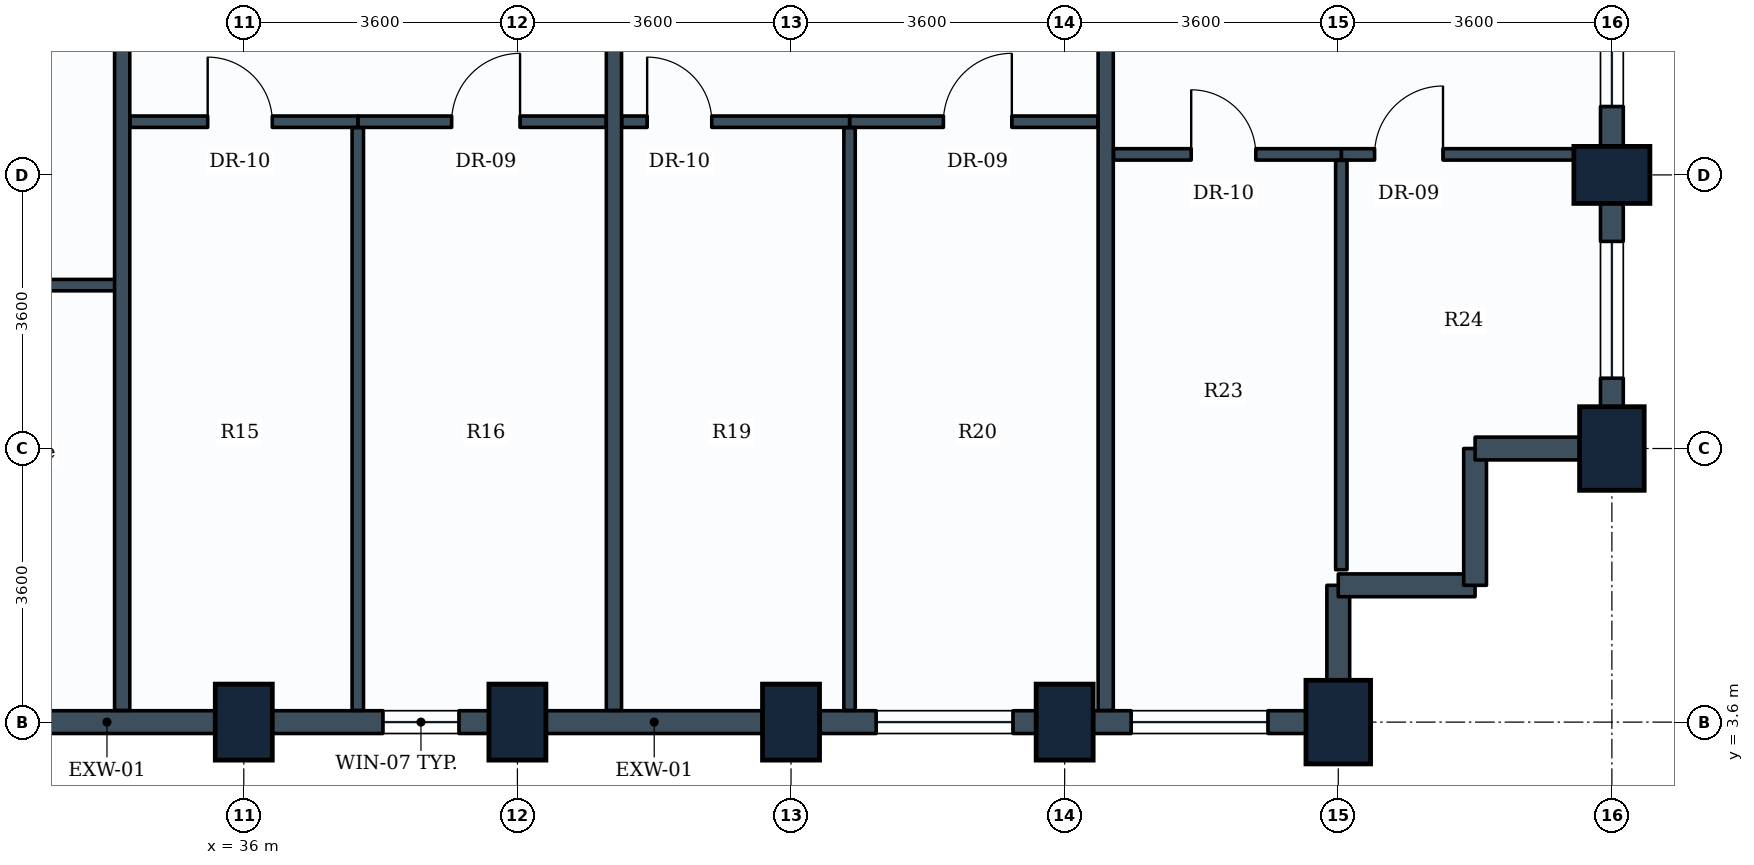
"""IFC4 building model, lengths in metres.
Left out: names, types, materials, properties, quantities, classifications, styles, units other than length and angle.
Written with IfcOpenShell. Run it as: python <this file> out.ifc"""

import sys

from ifc_helpers import new_model, si_unit, direction, frame, frame_2d, origin, origin_2d, place, context, subcontext, project, spatial, rectangle, extrude, element, fill, save


model = new_model("IFC4")
c1 = context("Model", 3, precision=1e-05, world=origin(), true_north=direction((0.0, 1.0)))
c2 = subcontext(c1, "Body", "Model", "MODEL_VIEW")
j1 = project(units=[si_unit("LENGTHUNIT", "METRE"), si_unit("PLANEANGLEUNIT", "RADIAN")], contexts=[c1])
p1 = place(None, origin())
s1 = spatial("IfcSite", under=j1, at=p1, CompositionType="ELEMENT")
p2 = place(p1, origin())
s2 = spatial("IfcBuilding", under=s1, at=p2, CompositionType="ELEMENT")
p3 = place(p2, frame((0.0, 0.0, 150.4)))
s3 = spatial("IfcBuildingStorey", under=s2, at=p3, CompositionType="ELEMENT", Elevation=150.4)
for number, where, z_axis, x_axis in (
    (1, (36.0, 3.6, 0.0), (0.0, 0.0, 1.0), (1.0, 0.0, 0.0)),
    (2, (39.6, 3.6, 0.0), (0.0, 0.0, 1.0), (1.0, 0.0, 0.0)),
    (3, (43.2, 3.6, 0.0), (0.0, 0.0, 1.0), (1.0, 0.0, 0.0)),
    (4, (46.8, 3.6, 0.0), (0.0, 0.0, 1.0), (1.0, 0.0, 0.0)),
):
    element("IfcColumn", number, at=place(p3, frame(where, z_axis=z_axis, x_axis=x_axis)), inside=s3, PredefinedType="COLUMN", context=c2, shape_type="SweptSolid", body=[
        extrude(rectangle(XDim=0.75, YDim=1.0, at=origin_2d()), origin(), (0.0, 0.0, 1.0), 3.8),
    ])
for number, where, z_axis, x_axis in (
    (5, (50.4, 3.6, 0.0), (0.0, 0.0, 1.0), (1.0, 0.0, 0.0)),
    (6, (54.0, 7.2, 0.0), (0.0, 0.0, 1.0), (1.0, 0.0, 0.0)),
):
    element("IfcColumn", number, at=place(p3, frame(where, z_axis=z_axis, x_axis=x_axis)), inside=s3, PredefinedType="COLUMN", context=c2, shape_type="SweptSolid", body=[
        extrude(rectangle(XDim=0.85, YDim=1.1, at=origin_2d()), origin(), (0.0, 0.0, 1.0), 3.8),
    ])
p4 = place(p3, frame((54.0, 10.8, 0.0), z_axis=(0.0, 0.0, 1.0), x_axis=(0.0, 1.0, 0.0)))
e7 = element("IfcColumn", 7, at=p4, inside=s3, PredefinedType="COLUMN", context=c2, shape_type="SweptSolid", body=[
    extrude(rectangle(XDim=0.75, YDim=1.0, at=origin_2d()), origin(), (0.0, 0.0, 1.0), 3.8),
])
p5 = place(p3, frame((36.0, 3.6, 0.0), z_axis=(0.0, 0.0, 1.0), x_axis=(-1.0, 0.0, 0.0)))
e8 = element("IfcWall", 8, at=p5, inside=s3, PredefinedType="STANDARD", context=c2, shape_type="SweptSolid", body=[
    extrude(rectangle(XDim=3.6, YDim=0.3, at=frame_2d((1.8, 0.0))), origin(), (0.0, 0.0, 1.0), 2.93),
])
p6 = place(p3, frame((39.6, 3.6, 0.0), z_axis=(0.0, 0.0, 1.0), x_axis=(-1.0, 0.0, 0.0)))
e9 = element("IfcWall", 9, at=p6, inside=s3, PredefinedType="STANDARD", context=c2, shape_type="SweptSolid", body=[
    extrude(rectangle(XDim=3.6, YDim=0.3, at=frame_2d((1.8, 0.0))), origin(), (0.0, 0.0, 1.0), 2.93),
])
p7 = place(p6, frame((0.769, 0.0, 0.85)))
e10 = element("IfcOpeningElement", 10, at=p7, cuts=e9, PredefinedType="OPENING", context=c2, shape_type="SweptSolid", body=[
    extrude(rectangle(XDim=1.0, YDim=1.35, at=frame_2d((0.5, 0.675))), frame((0.0, 0.16, 0.0), z_axis=(0.0, -1.0, 0.0), x_axis=(1.0, 0.0, 0.0)), (0.0, 0.0, 1.0), 0.32),
])
p8 = place(p3, frame((43.2, 3.6, 0.0), z_axis=(0.0, 0.0, 1.0), x_axis=(-1.0, 0.0, 0.0)))
e11 = element("IfcWall", 11, at=p8, inside=s3, PredefinedType="STANDARD", context=c2, shape_type="SweptSolid", body=[
    extrude(rectangle(XDim=3.6, YDim=0.3, at=frame_2d((1.8, 0.0))), origin(), (0.0, 0.0, 1.0), 2.93),
])
p9 = place(p3, frame((46.8, 3.6, 0.0), z_axis=(0.0, 0.0, 1.0), x_axis=(-1.0, 0.0, 0.0)))
e12 = element("IfcWall", 12, at=p9, inside=s3, PredefinedType="STANDARD", context=c2, shape_type="SweptSolid", body=[
    extrude(rectangle(XDim=3.6, YDim=0.3, at=frame_2d((1.8, 0.0))), origin(), (0.0, 0.0, 1.0), 2.93),
])
p10 = place(p9, frame((0.68, 0.0, 0.85)))
e13 = element("IfcOpeningElement", 13, at=p10, cuts=e12, PredefinedType="OPENING", context=c2, shape_type="SweptSolid", body=[
    extrude(rectangle(XDim=1.8, YDim=1.35, at=frame_2d((0.9, 0.675))), frame((0.0, 0.16, 0.0), z_axis=(0.0, -1.0, 0.0), x_axis=(1.0, 0.0, 0.0)), (0.0, 0.0, 1.0), 0.32),
])
p11 = place(p3, frame((50.4, 3.6, 0.0), z_axis=(0.0, 0.0, 1.0), x_axis=(-1.0, 0.0, 0.0)))
e14 = element("IfcWall", 14, at=p11, inside=s3, PredefinedType="STANDARD", context=c2, shape_type="SweptSolid", body=[
    extrude(rectangle(XDim=3.6, YDim=0.3, at=frame_2d((1.8, 0.0))), origin(), (0.0, 0.0, 1.0), 2.93),
])
p12 = place(p11, frame((0.925, 0.0, 0.85)))
e15 = element("IfcOpeningElement", 15, at=p12, cuts=e14, PredefinedType="OPENING", context=c2, shape_type="SweptSolid", body=[
    extrude(rectangle(XDim=1.8, YDim=1.35, at=frame_2d((0.9, 0.675))), frame((0.0, 0.16, 0.0), z_axis=(0.0, -1.0, 0.0), x_axis=(1.0, 0.0, 0.0)), (0.0, 0.0, 1.0), 0.32),
])
p13 = place(p3, frame((50.4, 5.4, 0.0), z_axis=(0.0, 0.0, 1.0), x_axis=(0.0, -1.0, 0.0)))
e16 = element("IfcWall", 16, at=p13, inside=s3, PredefinedType="STANDARD", context=c2, shape_type="SweptSolid", body=[
    extrude(rectangle(XDim=1.8, YDim=0.3, at=frame_2d((0.9, 0.0))), origin(), (0.0, 0.0, 1.0), 2.93),
])
for number, where, z_axis, x_axis in (
    (17, (52.2, 5.4, 0.0), (0.0, 0.0, 1.0), (-1.0, 0.0, 0.0)),
    (18, (52.2, 7.2, 0.0), (0.0, 0.0, 1.0), (0.0, -1.0, 0.0)),
):
    element("IfcWall", number, at=place(p3, frame(where, z_axis=z_axis, x_axis=x_axis)), inside=s3, PredefinedType="STANDARD", context=c2, shape_type="SweptSolid", body=[
        extrude(rectangle(XDim=1.8, YDim=0.3, at=frame_2d((0.9, 0.0))), origin(), (0.0, 0.0, 1.0), 3.535),
    ])
p14 = place(p3, frame((54.0, 7.2, 0.0), z_axis=(0.0, 0.0, 1.0), x_axis=(-1.0, 0.0, 0.0)))
e19 = element("IfcWall", 19, at=p14, inside=s3, PredefinedType="STANDARD", context=c2, shape_type="SweptSolid", body=[
    extrude(rectangle(XDim=1.8, YDim=0.3, at=frame_2d((0.9, 0.0))), origin(), (0.0, 0.0, 1.0), 2.93),
])
p15 = place(p3, frame((54.0, 10.8, 0.0), z_axis=(0.0, 0.0, 1.0), x_axis=(0.0, -1.0, 0.0)))
e20 = element("IfcWall", 20, at=p15, inside=s3, PredefinedType="STANDARD", context=c2, shape_type="SweptSolid", body=[
    extrude(rectangle(XDim=3.6, YDim=0.3, at=frame_2d((1.8, 0.0))), origin(), (0.0, 0.0, 1.0), 2.93),
])
p16 = place(p15, frame((0.875, 0.0, 0.85)))
e21 = element("IfcOpeningElement", 21, at=p16, cuts=e20, PredefinedType="OPENING", context=c2, shape_type="SweptSolid", body=[
    extrude(rectangle(XDim=1.8, YDim=1.35, at=frame_2d((0.9, 0.675))), frame((0.0, 0.16, 0.0), z_axis=(0.0, -1.0, 0.0), x_axis=(1.0, 0.0, 0.0)), (0.0, 0.0, 1.0), 0.32),
])
p17 = place(p3, frame((54.0, 14.4, 0.0), z_axis=(0.0, 0.0, 1.0), x_axis=(0.0, -1.0, 0.0)))
e22 = element("IfcWall", 22, at=p17, inside=s3, PredefinedType="STANDARD", context=c2, shape_type="SweptSolid", body=[
    extrude(rectangle(XDim=3.6, YDim=0.3, at=frame_2d((1.8, 0.0))), origin(), (0.0, 0.0, 1.0), 2.93),
])
p18 = place(p17, frame((0.9, 0.0, 0.85)))
e23 = element("IfcOpeningElement", 23, at=p18, cuts=e22, PredefinedType="OPENING", context=c2, shape_type="SweptSolid", body=[
    extrude(rectangle(XDim=1.8, YDim=1.35, at=frame_2d((0.9, 0.675))), frame((0.0, 0.16, 0.0), z_axis=(0.0, -1.0, 0.0), x_axis=(1.0, 0.0, 0.0)), (0.0, 0.0, 1.0), 0.32),
])
p19 = place(p3, frame((28.879, 9.35, 0.0), z_axis=(0.0, 0.0, 1.0), x_axis=(1.0, 0.0, 0.0)))
e24 = element("IfcWall", 24, at=p19, inside=s3, PredefinedType="PARTITIONING", context=c2, shape_type="SweptSolid", body=[
    extrude(rectangle(XDim=5.521, YDim=0.15, at=frame_2d((2.76, 0.0))), origin(), (0.0, 0.0, 1.0), 3.535),
])
p20 = place(p19, frame((0.36, 0.0, 0.0)))
e25 = element("IfcOpeningElement", 25, at=p20, cuts=e24, PredefinedType="OPENING", context=c2, shape_type="SweptSolid", body=[
    extrude(rectangle(XDim=1.0, YDim=2.1, at=frame_2d((0.5, 1.05))), frame((0.0, 0.085, 0.0), z_axis=(0.0, -1.0, 0.0), x_axis=(1.0, 0.0, 0.0)), (0.0, 0.0, 1.0), 0.17),
])
for number, where, z_axis, x_axis in (
    (26, (34.4, 3.754, 0.0), (0.0, 0.0, 1.0), (0.0, 1.0, 0.0)),
    (27, (40.87, 3.754, 0.0), (0.0, 0.0, 1.0), (0.0, 1.0, 0.0)),
):
    element("IfcWall", number, at=place(p3, frame(where, z_axis=z_axis, x_axis=x_axis)), inside=s3, PredefinedType="PARTITIONING", context=c2, shape_type="SweptSolid", body=[
        extrude(rectangle(XDim=14.096, YDim=0.2, at=frame_2d((7.048, 0.0))), origin(), (0.0, 0.0, 1.0), 2.93),
    ])
p21 = place(p3, frame((37.5, 11.5, 0.0), z_axis=(0.0, 0.0, 1.0), x_axis=(1.0, 0.0, 0.0)))
e28 = element("IfcWall", 28, at=p21, inside=s3, PredefinedType="PARTITIONING", context=c2, shape_type="SweptSolid", body=[
    extrude(rectangle(XDim=3.266, YDim=0.15, at=frame_2d((1.633, 0.0))), origin(), (0.0, 0.0, 1.0), 3.17),
])
p22 = place(p21, frame((1.235, 0.0, 0.0)))
e29 = element("IfcOpeningElement", 29, at=p22, cuts=e28, PredefinedType="OPENING", context=c2, shape_type="SweptSolid", body=[
    extrude(rectangle(XDim=0.9, YDim=2.1, at=frame_2d((0.45, 1.05))), frame((0.0, 0.085, 0.0), z_axis=(0.0, -1.0, 0.0), x_axis=(1.0, 0.0, 0.0)), (0.0, 0.0, 1.0), 0.17),
])
p23 = place(p3, frame((34.504, 11.5, 0.0), z_axis=(0.0, 0.0, 1.0), x_axis=(1.0, 0.0, 0.0)))
e30 = element("IfcWall", 30, at=p23, inside=s3, PredefinedType="PARTITIONING", context=c2, shape_type="SweptSolid", body=[
    extrude(rectangle(XDim=2.996, YDim=0.15, at=frame_2d((1.498, 0.0))), origin(), (0.0, 0.0, 1.0), 3.22),
])
p24 = place(p23, frame((1.021, 0.0, 0.0)))
e31 = element("IfcOpeningElement", 31, at=p24, cuts=e30, PredefinedType="OPENING", context=c2, shape_type="SweptSolid", body=[
    extrude(rectangle(XDim=0.85, YDim=2.1, at=frame_2d((0.425, 1.05))), frame((0.0, 0.085, 0.0), z_axis=(0.0, -1.0, 0.0), x_axis=(1.0, 0.0, 0.0)), (0.0, 0.0, 1.0), 0.17),
])
p25 = place(p3, frame((37.5, 3.754, 0.0), z_axis=(0.0, 0.0, 1.0), x_axis=(0.0, 1.0, 0.0)))
e32 = element("IfcWall", 32, at=p25, inside=s3, PredefinedType="PARTITIONING", context=c2, shape_type="SweptSolid", body=[
    extrude(rectangle(XDim=7.667, YDim=0.15, at=frame_2d((3.833, 0.0))), origin(), (0.0, 0.0, 1.0), 2.93),
])
p26 = place(p3, frame((47.34, 3.754, 0.0), z_axis=(0.0, 0.0, 1.0), x_axis=(0.0, 1.0, 0.0)))
e33 = element("IfcWall", 33, at=p26, inside=s3, PredefinedType="PARTITIONING", context=c2, shape_type="SweptSolid", body=[
    extrude(rectangle(XDim=14.096, YDim=0.2, at=frame_2d((7.048, 0.0))), origin(), (0.0, 0.0, 1.0), 2.93),
])
p27 = place(p3, frame((43.97, 11.5, 0.0), z_axis=(0.0, 0.0, 1.0), x_axis=(1.0, 0.0, 0.0)))
e34 = element("IfcWall", 34, at=p27, inside=s3, PredefinedType="PARTITIONING", context=c2, shape_type="SweptSolid", body=[
    extrude(rectangle(XDim=3.266, YDim=0.15, at=frame_2d((1.633, 0.0))), origin(), (0.0, 0.0, 1.0), 3.17),
])
p28 = place(p27, frame((1.235, 0.0, 0.0)))
e35 = element("IfcOpeningElement", 35, at=p28, cuts=e34, PredefinedType="OPENING", context=c2, shape_type="SweptSolid", body=[
    extrude(rectangle(XDim=0.9, YDim=2.1, at=frame_2d((0.45, 1.05))), frame((0.0, 0.085, 0.0), z_axis=(0.0, -1.0, 0.0), x_axis=(1.0, 0.0, 0.0)), (0.0, 0.0, 1.0), 0.17),
])
p29 = place(p3, frame((40.974, 11.5, 0.0), z_axis=(0.0, 0.0, 1.0), x_axis=(1.0, 0.0, 0.0)))
e36 = element("IfcWall", 36, at=p29, inside=s3, PredefinedType="PARTITIONING", context=c2, shape_type="SweptSolid", body=[
    extrude(rectangle(XDim=2.996, YDim=0.15, at=frame_2d((1.498, 0.0))), origin(), (0.0, 0.0, 1.0), 3.18),
])
p30 = place(p29, frame((0.333, 0.0, 0.0)))
e37 = element("IfcOpeningElement", 37, at=p30, cuts=e36, PredefinedType="OPENING", context=c2, shape_type="SweptSolid", body=[
    extrude(rectangle(XDim=0.85, YDim=2.1, at=frame_2d((0.425, 1.05))), frame((0.0, 0.085, 0.0), z_axis=(0.0, -1.0, 0.0), x_axis=(1.0, 0.0, 0.0)), (0.0, 0.0, 1.0), 0.17),
])
p31 = place(p3, frame((43.97, 3.754, 0.0), z_axis=(0.0, 0.0, 1.0), x_axis=(0.0, 1.0, 0.0)))
e38 = element("IfcWall", 38, at=p31, inside=s3, PredefinedType="PARTITIONING", context=c2, shape_type="SweptSolid", body=[
    extrude(rectangle(XDim=7.667, YDim=0.15, at=frame_2d((3.833, 0.0))), origin(), (0.0, 0.0, 1.0), 2.93),
])
p32 = place(p3, frame((50.44, 11.07, 0.0), z_axis=(0.0, 0.0, 1.0), x_axis=(1.0, 0.0, 0.0)))
e39 = element("IfcWall", 39, at=p32, inside=s3, PredefinedType="PARTITIONING", context=c2, shape_type="SweptSolid", body=[
    extrude(rectangle(XDim=3.406, YDim=0.15, at=frame_2d((1.703, 0.0))), origin(), (0.0, 0.0, 1.0), 2.93),
])
p33 = place(p32, frame((0.438, 0.0, 0.0)))
e40 = element("IfcOpeningElement", 40, at=p33, cuts=e39, PredefinedType="OPENING", context=c2, shape_type="SweptSolid", body=[
    extrude(rectangle(XDim=0.9, YDim=2.1, at=frame_2d((0.45, 1.05))), frame((0.0, 0.085, 0.0), z_axis=(0.0, -1.0, 0.0), x_axis=(1.0, 0.0, 0.0)), (0.0, 0.0, 1.0), 0.17),
])
p34 = place(p3, frame((47.444, 11.07, 0.0), z_axis=(0.0, 0.0, 1.0), x_axis=(1.0, 0.0, 0.0)))
e41 = element("IfcWall", 41, at=p34, inside=s3, PredefinedType="PARTITIONING", context=c2, shape_type="SweptSolid", body=[
    extrude(rectangle(XDim=2.996, YDim=0.15, at=frame_2d((1.498, 0.0))), origin(), (0.0, 0.0, 1.0), 3.535),
])
p35 = place(p34, frame((1.021, 0.0, 0.0)))
e42 = element("IfcOpeningElement", 42, at=p35, cuts=e41, PredefinedType="OPENING", context=c2, shape_type="SweptSolid", body=[
    extrude(rectangle(XDim=0.85, YDim=2.1, at=frame_2d((0.425, 1.05))), frame((0.0, 0.085, 0.0), z_axis=(0.0, -1.0, 0.0), x_axis=(1.0, 0.0, 0.0)), (0.0, 0.0, 1.0), 0.17),
])
p36 = place(p3, frame((50.44, 5.605, 0.0), z_axis=(0.0, 0.0, 1.0), x_axis=(0.0, 1.0, 0.0)))
e43 = element("IfcWall", 43, at=p36, inside=s3, PredefinedType="PARTITIONING", context=c2, shape_type="SweptSolid", body=[
    extrude(rectangle(XDim=5.386, YDim=0.15, at=frame_2d((2.693, 0.0))), origin(), (0.0, 0.0, 1.0), 3.535),
])
p37 = place(p10, origin())
e44 = element("IfcWindow", 44, at=p37, inside=s3, PartitioningType="SINGLE_PANEL", PredefinedType="WINDOW", context=c2, shape_type="SweptSolid", body=[
    extrude(rectangle(XDim=1.8, YDim=1.35, at=frame_2d((0.9, 0.675))), frame((0.0, 0.03, 0.0), z_axis=(0.0, -1.0, 0.0), x_axis=(1.0, 0.0, 0.0)), (0.0, 0.0, 1.0), 0.06),
])
fill(e13, e44)
p38 = place(p12, origin())
e45 = element("IfcWindow", 45, at=p38, inside=s3, PartitioningType="SINGLE_PANEL", PredefinedType="WINDOW", context=c2, shape_type="SweptSolid", body=[
    extrude(rectangle(XDim=1.8, YDim=1.35, at=frame_2d((0.9, 0.675))), frame((0.0, 0.03, 0.0), z_axis=(0.0, -1.0, 0.0), x_axis=(1.0, 0.0, 0.0)), (0.0, 0.0, 1.0), 0.06),
])
fill(e15, e45)
p39 = place(p16, origin())
e46 = element("IfcWindow", 46, at=p39, inside=s3, PartitioningType="SINGLE_PANEL", PredefinedType="WINDOW", context=c2, shape_type="SweptSolid", body=[
    extrude(rectangle(XDim=1.8, YDim=1.35, at=frame_2d((0.9, 0.675))), frame((0.0, 0.03, 0.0), z_axis=(0.0, -1.0, 0.0), x_axis=(1.0, 0.0, 0.0)), (0.0, 0.0, 1.0), 0.06),
])
fill(e21, e46)
p40 = place(p18, origin())
e47 = element("IfcWindow", 47, at=p40, inside=s3, PartitioningType="SINGLE_PANEL", PredefinedType="WINDOW", context=c2, shape_type="SweptSolid", body=[
    extrude(rectangle(XDim=1.8, YDim=1.35, at=frame_2d((0.9, 0.675))), frame((0.0, 0.03, 0.0), z_axis=(0.0, -1.0, 0.0), x_axis=(1.0, 0.0, 0.0)), (0.0, 0.0, 1.0), 0.06),
])
fill(e23, e47)
p41 = place(p22, origin())
e48 = element("IfcDoor", 48, at=p41, inside=s3, OperationType="SINGLE_SWING_RIGHT", PredefinedType="DOOR", context=c2, shape_type="SweptSolid", body=[
    extrude(rectangle(XDim=0.9, YDim=2.1, at=frame_2d((0.45, 1.05))), frame((0.0, 0.025, 0.0), z_axis=(0.0, -1.0, 0.0), x_axis=(1.0, 0.0, 0.0)), (0.0, 0.0, 1.0), 0.05),
])
fill(e29, e48)
p42 = place(p24, origin())
e49 = element("IfcDoor", 49, at=p42, inside=s3, OperationType="SINGLE_SWING_LEFT", PredefinedType="DOOR", context=c2, shape_type="SweptSolid", body=[
    extrude(rectangle(XDim=0.85, YDim=2.1, at=frame_2d((0.425, 1.05))), frame((0.0, 0.025, 0.0), z_axis=(0.0, -1.0, 0.0), x_axis=(1.0, 0.0, 0.0)), (0.0, 0.0, 1.0), 0.05),
])
fill(e31, e49)
p43 = place(p28, origin())
e50 = element("IfcDoor", 50, at=p43, inside=s3, OperationType="SINGLE_SWING_RIGHT", PredefinedType="DOOR", context=c2, shape_type="SweptSolid", body=[
    extrude(rectangle(XDim=0.9, YDim=2.1, at=frame_2d((0.45, 1.05))), frame((0.0, 0.025, 0.0), z_axis=(0.0, -1.0, 0.0), x_axis=(1.0, 0.0, 0.0)), (0.0, 0.0, 1.0), 0.05),
])
fill(e35, e50)
p44 = place(p30, origin())
e51 = element("IfcDoor", 51, at=p44, inside=s3, OperationType="SINGLE_SWING_LEFT", PredefinedType="DOOR", context=c2, shape_type="SweptSolid", body=[
    extrude(rectangle(XDim=0.85, YDim=2.1, at=frame_2d((0.425, 1.05))), frame((0.0, 0.025, 0.0), z_axis=(0.0, -1.0, 0.0), x_axis=(1.0, 0.0, 0.0)), (0.0, 0.0, 1.0), 0.05),
])
fill(e37, e51)
p45 = place(p33, origin())
e52 = element("IfcDoor", 52, at=p45, inside=s3, OperationType="SINGLE_SWING_RIGHT", PredefinedType="DOOR", context=c2, shape_type="SweptSolid", body=[
    extrude(rectangle(XDim=0.9, YDim=2.1, at=frame_2d((0.45, 1.05))), frame((0.0, 0.025, 0.0), z_axis=(0.0, -1.0, 0.0), x_axis=(1.0, 0.0, 0.0)), (0.0, 0.0, 1.0), 0.05),
])
fill(e40, e52)
p46 = place(p35, origin())
e53 = element("IfcDoor", 53, at=p46, inside=s3, OperationType="SINGLE_SWING_LEFT", PredefinedType="DOOR", context=c2, shape_type="SweptSolid", body=[
    extrude(rectangle(XDim=0.85, YDim=2.1, at=frame_2d((0.425, 1.05))), frame((0.0, 0.025, 0.0), z_axis=(0.0, -1.0, 0.0), x_axis=(1.0, 0.0, 0.0)), (0.0, 0.0, 1.0), 0.05),
])
fill(e42, e53)
p47 = place(p7, origin())
e54 = element("IfcWindow", 54, at=p47, inside=s3, PartitioningType="SINGLE_PANEL", PredefinedType="WINDOW", context=c2, shape_type="SweptSolid", body=[
    extrude(rectangle(XDim=1.0, YDim=1.35, at=frame_2d((0.5, 0.675))), frame((0.0, 0.03, 0.0), z_axis=(0.0, -1.0, 0.0), x_axis=(1.0, 0.0, 0.0)), (0.0, 0.0, 1.0), 0.06),
])
fill(e10, e54)
save(model, sys.argv[1])
